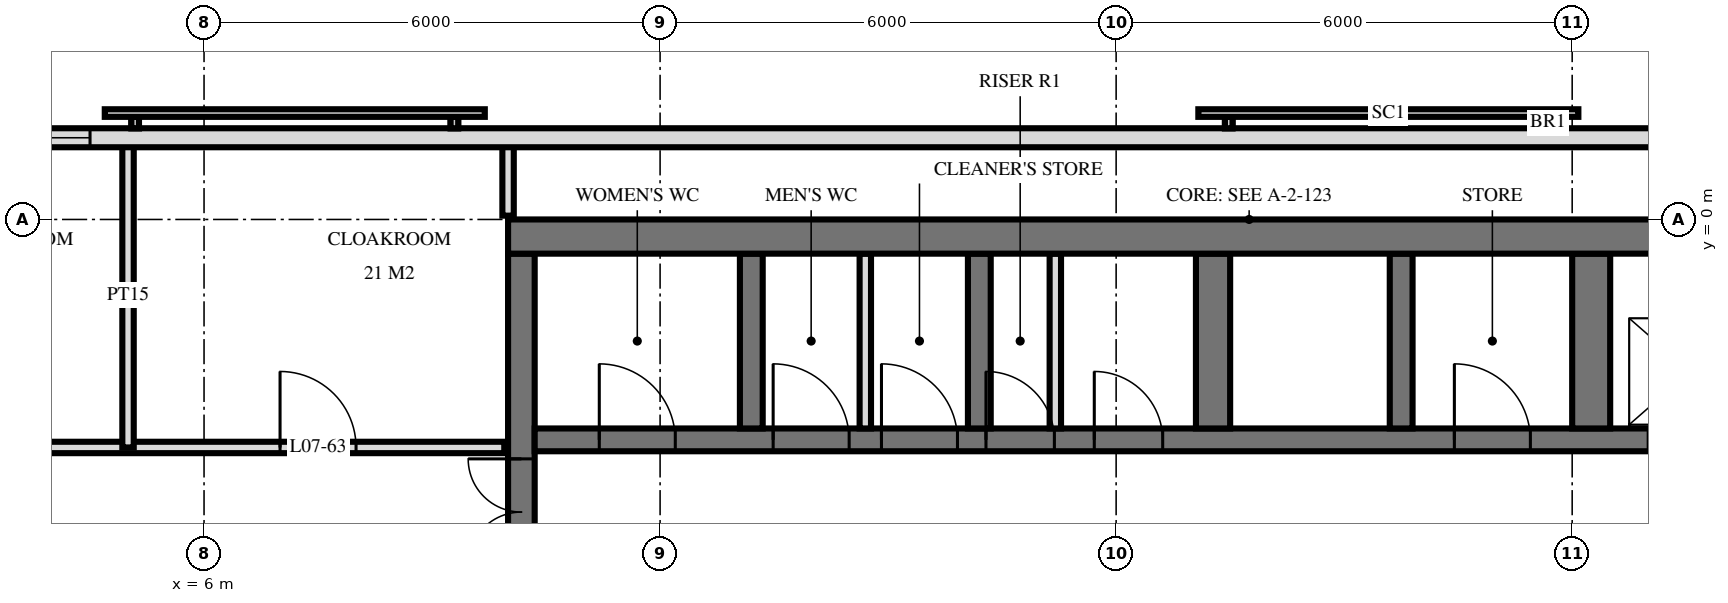
"""IFC4 building model, lengths in metres.
Left out: names, types, materials, properties, quantities, classifications, styles, units other than length and angle.
Written with IfcOpenShell. Run it as: python <this file> out.ifc"""

import sys

from ifc_helpers import new_model, si_unit, direction, frame, frame_2d, origin, place, context, subcontext, project, spatial, rectangle, extrude, element, fill, save


model = new_model("IFC4")
c1 = context("Model", 3, precision=1e-05, world=origin(), true_north=direction((0.0, 1.0)))
c2 = subcontext(c1, "Body", "Model", "MODEL_VIEW")
j1 = project(units=[si_unit("LENGTHUNIT", "METRE"), si_unit("PLANEANGLEUNIT", "RADIAN")], contexts=[c1])
p1 = place(None, origin())
s1 = spatial("IfcSite", under=j1, at=p1, CompositionType="ELEMENT")
p2 = place(p1, origin())
s2 = spatial("IfcBuilding", under=s1, at=p2, CompositionType="ELEMENT")
p3 = place(p2, frame((0.0, 0.0, 34.8)))
s3 = spatial("IfcBuildingStorey", under=s2, at=p3, CompositionType="ELEMENT", Elevation=34.8)
p4 = place(p3, frame((10.0, -0.225, 0.0), z_axis=(0.0, 0.0, 1.0), x_axis=(1.0, 0.0, 0.0)))
e1 = element("IfcWall", 1, at=p4, inside=s3, PredefinedType="SHEAR", context=c2, shape_type="SweptSolid", body=[
    extrude(rectangle(XDim=19.5, YDim=0.45, at=frame_2d((9.75, 0.0))), origin(), (0.0, 0.0, 1.0), 3.6),
])
p5 = place(p3, frame((10.175, -14.55, 0.0), z_axis=(0.0, 0.0, 1.0), x_axis=(0.0, 1.0, 0.0)))
e2 = element("IfcWall", 2, at=p5, inside=s3, PredefinedType="SHEAR", context=c2, shape_type="SweptSolid", body=[
    extrude(rectangle(XDim=14.1, YDim=0.35, at=frame_2d((7.05, 0.0))), origin(), (0.0, 0.0, 1.0), 3.6),
])
p6 = place(p5, frame((8.4, 0.0, 0.0)))
e3 = element("IfcOpeningElement", 3, at=p6, cuts=e2, PredefinedType="OPENING", context=c2, shape_type="SweptSolid", body=[
    extrude(rectangle(XDim=1.4, YDim=2.4, at=frame_2d((0.7, 1.2))), frame((0.0, 0.185, 0.0), z_axis=(0.0, -1.0, 0.0), x_axis=(1.0, 0.0, 0.0)), (0.0, 0.0, 1.0), 0.37),
])
p7 = place(p5, frame((10.0, 0.0, 0.0)))
e4 = element("IfcOpeningElement", 4, at=p7, cuts=e2, PredefinedType="OPENING", context=c2, shape_type="SweptSolid", body=[
    extrude(rectangle(XDim=1.4, YDim=2.4, at=frame_2d((0.7, 1.2))), frame((0.0, 0.185, 0.0), z_axis=(0.0, -1.0, 0.0), x_axis=(1.0, 0.0, 0.0)), (0.0, 0.0, 1.0), 0.37),
])
p8 = place(p5, frame((4.0, 0.0, 0.0)))
e5 = element("IfcOpeningElement", 5, at=p8, cuts=e2, PredefinedType="OPENING", context=c2, shape_type="SweptSolid", body=[
    extrude(rectangle(XDim=1.2, YDim=2.1, at=frame_2d((0.6, 1.05))), frame((0.0, 0.185, 0.0), z_axis=(0.0, -1.0, 0.0), x_axis=(1.0, 0.0, 0.0)), (0.0, 0.0, 1.0), 0.37),
])
p9 = place(p3, frame((10.35, -2.9, 0.0), z_axis=(0.0, 0.0, 1.0), x_axis=(1.0, 0.0, 0.0)))
e6 = element("IfcWall", 6, at=p9, inside=s3, PredefinedType="SHEAR", context=c2, shape_type="SweptSolid", body=[
    extrude(rectangle(XDim=18.7, YDim=0.3, at=frame_2d((9.35, 0.0))), origin(), (0.0, 0.0, 1.0), 3.6),
])
p10 = place(p9, frame((14.65, 0.0, 0.0)))
e7 = element("IfcOpeningElement", 7, at=p10, cuts=e6, PredefinedType="OPENING", context=c2, shape_type="SweptSolid", body=[
    extrude(rectangle(XDim=1.1, YDim=2.1, at=frame_2d((0.55, 1.05))), frame((0.0, 0.16, 0.0), z_axis=(0.0, -1.0, 0.0), x_axis=(1.0, 0.0, 0.0)), (0.0, 0.0, 1.0), 0.32),
])
p11 = place(p9, frame((17.05, 0.0, 0.0)))
e8 = element("IfcOpeningElement", 8, at=p11, cuts=e6, PredefinedType="OPENING", context=c2, shape_type="SweptSolid", body=[
    extrude(rectangle(XDim=1.1, YDim=2.1, at=frame_2d((0.55, 1.05))), frame((0.0, 0.16, 0.0), z_axis=(0.0, -1.0, 0.0), x_axis=(1.0, 0.0, 0.0)), (0.0, 0.0, 1.0), 0.32),
])
p12 = place(p9, frame((5.938, 0.0, 0.0)))
e9 = element("IfcOpeningElement", 9, at=p12, cuts=e6, PredefinedType="OPENING", context=c2, shape_type="SweptSolid", body=[
    extrude(rectangle(XDim=0.9, YDim=2.1, at=frame_2d((0.45, 1.05))), frame((0.0, 0.16, 0.0), z_axis=(0.0, -1.0, 0.0), x_axis=(1.0, 0.0, 0.0)), (0.0, 0.0, 1.0), 0.32),
])
p13 = place(p9, frame((7.363, 0.0, 0.0)))
e10 = element("IfcOpeningElement", 10, at=p13, cuts=e6, PredefinedType="OPENING", context=c2, shape_type="SweptSolid", body=[
    extrude(rectangle(XDim=0.9, YDim=2.1, at=frame_2d((0.45, 1.05))), frame((0.0, 0.16, 0.0), z_axis=(0.0, -1.0, 0.0), x_axis=(1.0, 0.0, 0.0)), (0.0, 0.0, 1.0), 0.32),
])
p14 = place(p9, frame((0.85, 0.0, 0.0)))
e11 = element("IfcOpeningElement", 11, at=p14, cuts=e6, PredefinedType="OPENING", context=c2, shape_type="SweptSolid", body=[
    extrude(rectangle(XDim=1.0, YDim=2.1, at=frame_2d((0.5, 1.05))), frame((0.0, 0.16, 0.0), z_axis=(0.0, -1.0, 0.0), x_axis=(1.0, 0.0, 0.0)), (0.0, 0.0, 1.0), 0.32),
])
p15 = place(p9, frame((3.137, 0.0, 0.0)))
e12 = element("IfcOpeningElement", 12, at=p15, cuts=e6, PredefinedType="OPENING", context=c2, shape_type="SweptSolid", body=[
    extrude(rectangle(XDim=1.0, YDim=2.1, at=frame_2d((0.5, 1.05))), frame((0.0, 0.16, 0.0), z_axis=(0.0, -1.0, 0.0), x_axis=(1.0, 0.0, 0.0)), (0.0, 0.0, 1.0), 0.32),
])
p16 = place(p9, frame((4.562, 0.0, 0.0)))
e13 = element("IfcOpeningElement", 13, at=p16, cuts=e6, PredefinedType="OPENING", context=c2, shape_type="SweptSolid", body=[
    extrude(rectangle(XDim=1.0, YDim=2.1, at=frame_2d((0.5, 1.05))), frame((0.0, 0.16, 0.0), z_axis=(0.0, -1.0, 0.0), x_axis=(1.0, 0.0, 0.0)), (0.0, 0.0, 1.0), 0.32),
])
p17 = place(p9, frame((12.1, 0.0, 0.0)))
e14 = element("IfcOpeningElement", 14, at=p17, cuts=e6, PredefinedType="OPENING", context=c2, shape_type="SweptSolid", body=[
    extrude(rectangle(XDim=1.0, YDim=2.1, at=frame_2d((0.5, 1.05))), frame((0.0, 0.16, 0.0), z_axis=(0.0, -1.0, 0.0), x_axis=(1.0, 0.0, 0.0)), (0.0, 0.0, 1.0), 0.32),
])
for number, where, z_axis, x_axis in (
    (15, (13.2, -2.75, 0.0), (0.0, 0.0, 1.0), (0.0, 1.0, 0.0)),
    (16, (16.2, -2.75, 0.0), (0.0, 0.0, 1.0), (0.0, 1.0, 0.0)),
):
    element("IfcWall", number, at=place(p3, frame(where, z_axis=z_axis, x_axis=x_axis)), inside=s3, PredefinedType="SHEAR", context=c2, shape_type="SweptSolid", body=[
        extrude(rectangle(XDim=2.3, YDim=0.3, at=frame_2d((1.15, 0.0))), origin(), (0.0, 0.0, 1.0), 3.6),
    ])
p18 = place(p3, frame((19.275, -2.75, 0.0), z_axis=(0.0, 0.0, 1.0), x_axis=(0.0, 1.0, 0.0)))
e17 = element("IfcWall", 17, at=p18, inside=s3, PredefinedType="SHEAR", context=c2, shape_type="SweptSolid", body=[
    extrude(rectangle(XDim=2.3, YDim=0.45, at=frame_2d((1.15, 0.0))), origin(), (0.0, 0.0, 1.0), 3.6),
])
p19 = place(p3, frame((21.75, -2.75, 0.0), z_axis=(0.0, 0.0, 1.0), x_axis=(0.0, 1.0, 0.0)))
e18 = element("IfcWall", 18, at=p19, inside=s3, PredefinedType="SHEAR", context=c2, shape_type="SweptSolid", body=[
    extrude(rectangle(XDim=2.3, YDim=0.3, at=frame_2d((1.15, 0.0))), origin(), (0.0, 0.0, 1.0), 3.6),
])
p20 = place(p3, frame((24.25, -2.75, 0.0), z_axis=(0.0, 0.0, 1.0), x_axis=(0.0, 1.0, 0.0)))
e19 = element("IfcWall", 19, at=p20, inside=s3, PredefinedType="SHEAR", context=c2, shape_type="SweptSolid", body=[
    extrude(rectangle(XDim=2.3, YDim=0.5, at=frame_2d((1.15, 0.0))), origin(), (0.0, 0.0, 1.0), 3.6),
])
p21 = place(p3, frame((28.775, 1.075, 0.0), z_axis=(0.0, 0.0, 1.0), x_axis=(-1.0, 0.0, 0.0)))
e20 = element("IfcWall", 20, at=p21, inside=s3, PredefinedType="SOLIDWALL", context=c2, shape_type="SweptSolid", body=[
    extrude(rectangle(XDim=57.551, YDim=0.25, at=frame_2d((28.775, 0.0))), origin(), (0.0, 0.0, 1.0), 3.32),
])
p22 = place(p21, frame((24.275, 0.0, 0.3)))
e21 = element("IfcOpeningElement", 21, at=p22, cuts=e20, PredefinedType="OPENING", context=c2, shape_type="SweptSolid", body=[
    extrude(rectangle(XDim=2.4, YDim=2.1, at=frame_2d((1.2, 1.05))), frame((0.0, 0.135, 0.0), z_axis=(0.0, -1.0, 0.0), x_axis=(1.0, 0.0, 0.0)), (0.0, 0.0, 1.0), 0.27),
])
p23 = place(p21, frame((35.325, 0.0, 0.3)))
e22 = element("IfcOpeningElement", 22, at=p23, cuts=e20, PredefinedType="OPENING", context=c2, shape_type="SweptSolid", body=[
    extrude(rectangle(XDim=2.4, YDim=2.1, at=frame_2d((1.2, 1.05))), frame((0.0, 0.135, 0.0), z_axis=(0.0, -1.0, 0.0), x_axis=(1.0, 0.0, 0.0)), (0.0, 0.0, 1.0), 0.27),
])
for number, where, z_axis, x_axis in (
    (23, (17.2, -2.75, 0.0), (0.0, 0.0, 1.0), (0.0, 1.0, 0.0)),
    (24, (14.7, -2.75, 0.0), (0.0, 0.0, 1.0), (0.0, 1.0, 0.0)),
):
    element("IfcWall", number, at=place(p3, frame(where, z_axis=z_axis, x_axis=x_axis)), inside=s3, PredefinedType="PARTITIONING", context=c2, shape_type="SweptSolid", body=[
        extrude(rectangle(XDim=2.3, YDim=0.15, at=frame_2d((1.15, 0.0))), origin(), (0.0, 0.0, 1.0), 3.3),
    ])
p24 = place(p3, frame((10.0, 0.05, 0.0), z_axis=(0.0, 0.0, 1.0), x_axis=(0.0, 1.0, 0.0)))
e25 = element("IfcWall", 25, at=p24, inside=s3, PredefinedType="PARTITIONING", context=c2, shape_type="SweptSolid", body=[
    extrude(rectangle(XDim=0.97, YDim=0.15, at=frame_2d((0.485, 0.0))), origin(), (0.0, 0.0, 1.0), 3.32),
])
p25 = place(p3, frame((5.0, -3.0, 0.0), z_axis=(0.0, 0.0, 1.0), x_axis=(0.0, 1.0, 0.0)))
e26 = element("IfcWall", 26, at=p25, inside=s3, PredefinedType="PARTITIONING", context=c2, shape_type="SweptSolid", body=[
    extrude(rectangle(XDim=4.02, YDim=0.15, at=frame_2d((2.01, 0.0))), origin(), (0.0, 0.0, 1.0), 3.32),
])
p26 = place(p3, frame((-9.95, -3.0, 0.0), z_axis=(0.0, 0.0, 1.0), x_axis=(1.0, 0.0, 0.0)))
e27 = element("IfcWall", 27, at=p26, inside=s3, PredefinedType="PARTITIONING", context=c2, shape_type="SweptSolid", body=[
    extrude(rectangle(XDim=19.9, YDim=0.15, at=frame_2d((9.95, 0.0))), origin(), (0.0, 0.0, 1.0), 3.32),
])
p27 = place(p26, frame((1.7, 0.0, 0.0)))
e28 = element("IfcOpeningElement", 28, at=p27, cuts=e27, PredefinedType="OPENING", context=c2, shape_type="SweptSolid", body=[
    extrude(rectangle(XDim=1.0, YDim=2.1, at=frame_2d((0.5, 1.05))), frame((0.0, 0.085, 0.0), z_axis=(0.0, -1.0, 0.0), x_axis=(1.0, 0.0, 0.0)), (0.0, 0.0, 1.0), 0.17),
])
p28 = place(p26, frame((5.45, 0.0, 0.0)))
e29 = element("IfcOpeningElement", 29, at=p28, cuts=e27, PredefinedType="OPENING", context=c2, shape_type="SweptSolid", body=[
    extrude(rectangle(XDim=1.0, YDim=2.1, at=frame_2d((0.5, 1.05))), frame((0.0, 0.085, 0.0), z_axis=(0.0, -1.0, 0.0), x_axis=(1.0, 0.0, 0.0)), (0.0, 0.0, 1.0), 0.17),
])
p29 = place(p26, frame((8.2, 0.0, 0.0)))
e30 = element("IfcOpeningElement", 30, at=p29, cuts=e27, PredefinedType="OPENING", context=c2, shape_type="SweptSolid", body=[
    extrude(rectangle(XDim=1.0, YDim=2.1, at=frame_2d((0.5, 1.05))), frame((0.0, 0.085, 0.0), z_axis=(0.0, -1.0, 0.0), x_axis=(1.0, 0.0, 0.0)), (0.0, 0.0, 1.0), 0.17),
])
p30 = place(p26, frame((11.95, 0.0, 0.0)))
e31 = element("IfcOpeningElement", 31, at=p30, cuts=e27, PredefinedType="OPENING", context=c2, shape_type="SweptSolid", body=[
    extrude(rectangle(XDim=1.0, YDim=2.1, at=frame_2d((0.5, 1.05))), frame((0.0, 0.085, 0.0), z_axis=(0.0, -1.0, 0.0), x_axis=(1.0, 0.0, 0.0)), (0.0, 0.0, 1.0), 0.17),
])
p31 = place(p26, frame((16.95, 0.0, 0.0)))
e32 = element("IfcOpeningElement", 32, at=p31, cuts=e27, PredefinedType="OPENING", context=c2, shape_type="SweptSolid", body=[
    extrude(rectangle(XDim=1.0, YDim=2.1, at=frame_2d((0.5, 1.05))), frame((0.0, 0.085, 0.0), z_axis=(0.0, -1.0, 0.0), x_axis=(1.0, 0.0, 0.0)), (0.0, 0.0, 1.0), 0.17),
])
p32 = place(p22, origin())
e33 = element("IfcWindow", 33, at=p32, inside=s3, PartitioningType="SINGLE_PANEL", PredefinedType="WINDOW", context=c2, shape_type="SweptSolid", body=[
    extrude(rectangle(XDim=2.4, YDim=2.1, at=frame_2d((1.2, 1.05))), frame((0.0, 0.03, 0.0), z_axis=(0.0, -1.0, 0.0), x_axis=(1.0, 0.0, 0.0)), (0.0, 0.0, 1.0), 0.06),
])
fill(e21, e33)
p33 = place(p7, origin())
e34 = element("IfcDoor", 34, at=p33, inside=s3, OperationType="DOUBLE_DOOR_SINGLE_SWING", PredefinedType="DOOR", context=c2, shape_type="SweptSolid", body=[
    extrude(rectangle(XDim=1.4, YDim=2.4, at=frame_2d((0.7, 1.2))), frame((0.0, 0.025, 0.0), z_axis=(0.0, -1.0, 0.0), x_axis=(1.0, 0.0, 0.0)), (0.0, 0.0, 1.0), 0.05),
])
fill(e4, e34)
p34 = place(p12, origin())
e35 = element("IfcDoor", 35, at=p34, inside=s3, OperationType="SINGLE_SWING_RIGHT", PredefinedType="DOOR", context=c2, shape_type="SweptSolid", body=[
    extrude(rectangle(XDim=0.9, YDim=2.1, at=frame_2d((0.45, 1.05))), frame((0.0, 0.025, 0.0), z_axis=(0.0, -1.0, 0.0), x_axis=(1.0, 0.0, 0.0)), (0.0, 0.0, 1.0), 0.05),
])
fill(e9, e35)
p35 = place(p13, origin())
e36 = element("IfcDoor", 36, at=p35, inside=s3, OperationType="SINGLE_SWING_RIGHT", PredefinedType="DOOR", context=c2, shape_type="SweptSolid", body=[
    extrude(rectangle(XDim=0.9, YDim=2.1, at=frame_2d((0.45, 1.05))), frame((0.0, 0.025, 0.0), z_axis=(0.0, -1.0, 0.0), x_axis=(1.0, 0.0, 0.0)), (0.0, 0.0, 1.0), 0.05),
])
fill(e10, e36)
p36 = place(p14, origin())
e37 = element("IfcDoor", 37, at=p36, inside=s3, OperationType="SINGLE_SWING_RIGHT", PredefinedType="DOOR", context=c2, shape_type="SweptSolid", body=[
    extrude(rectangle(XDim=1.0, YDim=2.1, at=frame_2d((0.5, 1.05))), frame((0.0, 0.025, 0.0), z_axis=(0.0, -1.0, 0.0), x_axis=(1.0, 0.0, 0.0)), (0.0, 0.0, 1.0), 0.05),
])
fill(e11, e37)
p37 = place(p15, origin())
e38 = element("IfcDoor", 38, at=p37, inside=s3, OperationType="SINGLE_SWING_RIGHT", PredefinedType="DOOR", context=c2, shape_type="SweptSolid", body=[
    extrude(rectangle(XDim=1.0, YDim=2.1, at=frame_2d((0.5, 1.05))), frame((0.0, 0.025, 0.0), z_axis=(0.0, -1.0, 0.0), x_axis=(1.0, 0.0, 0.0)), (0.0, 0.0, 1.0), 0.05),
])
fill(e12, e38)
p38 = place(p16, origin())
e39 = element("IfcDoor", 39, at=p38, inside=s3, OperationType="SINGLE_SWING_RIGHT", PredefinedType="DOOR", context=c2, shape_type="SweptSolid", body=[
    extrude(rectangle(XDim=1.0, YDim=2.1, at=frame_2d((0.5, 1.05))), frame((0.0, 0.025, 0.0), z_axis=(0.0, -1.0, 0.0), x_axis=(1.0, 0.0, 0.0)), (0.0, 0.0, 1.0), 0.05),
])
fill(e13, e39)
p39 = place(p17, origin())
e40 = element("IfcDoor", 40, at=p39, inside=s3, OperationType="SINGLE_SWING_RIGHT", PredefinedType="DOOR", context=c2, shape_type="SweptSolid", body=[
    extrude(rectangle(XDim=1.0, YDim=2.1, at=frame_2d((0.5, 1.05))), frame((0.0, 0.025, 0.0), z_axis=(0.0, -1.0, 0.0), x_axis=(1.0, 0.0, 0.0)), (0.0, 0.0, 1.0), 0.05),
])
fill(e14, e40)
p40 = place(p31, origin())
e41 = element("IfcDoor", 41, at=p40, inside=s3, OperationType="SINGLE_SWING_RIGHT", PredefinedType="DOOR", context=c2, shape_type="SweptSolid", body=[
    extrude(rectangle(XDim=1.0, YDim=2.1, at=frame_2d((0.5, 1.05))), frame((0.0, 0.025, 0.0), z_axis=(0.0, -1.0, 0.0), x_axis=(1.0, 0.0, 0.0)), (0.0, 0.0, 1.0), 0.05),
])
fill(e32, e41)
save(model, sys.argv[1])
